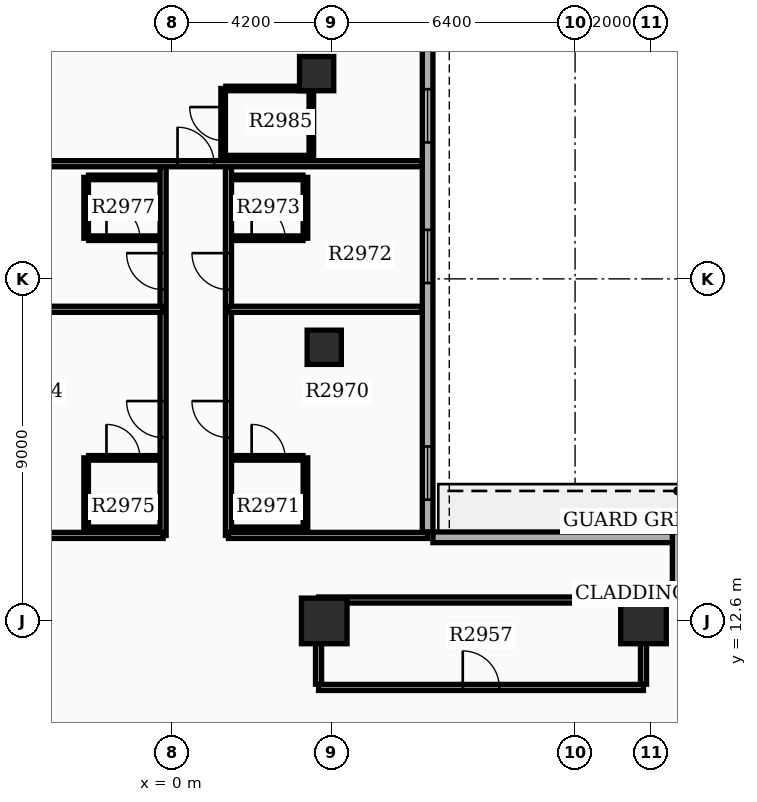
"""IFC4 building model, lengths in metres.
Left out: names, types, materials, properties, quantities, classifications, styles, units other than length and angle.
Written with IfcOpenShell. Run it as: python <this file> out.ifc"""

import sys

from ifc_helpers import new_model, si_unit, direction, frame, frame_2d, origin, origin_2d, place, context, subcontext, project, spatial, rectangle, extrude, element, fill, save


model = new_model("IFC4")
c1 = context("Model", 3, precision=1e-05, world=origin(), true_north=direction((0.0, 1.0)))
c2 = subcontext(c1, "Body", "Model", "MODEL_VIEW")
j1 = project(units=[si_unit("LENGTHUNIT", "METRE"), si_unit("PLANEANGLEUNIT", "RADIAN")], contexts=[c1])
p1 = place(None, origin())
s1 = spatial("IfcSite", under=j1, at=p1, CompositionType="ELEMENT")
p2 = place(p1, origin())
s2 = spatial("IfcBuilding", under=s1, at=p2, CompositionType="ELEMENT")
p3 = place(p2, frame((0.0, 0.0, 183.9)))
s3 = spatial("IfcBuildingStorey", under=s2, at=p3, CompositionType="ELEMENT", Elevation=183.9)
for number, where, z_axis, x_axis in (
    (1, (12.4, 12.6, 0.0), (0.0, 0.0, 1.0), (1.0, 0.0, 0.0)),
    (2, (4.0, 12.6, 0.0), (0.0, 0.0, 1.0), (1.0, 0.0, 0.0)),
):
    element("IfcColumn", number, at=place(p3, frame(where, z_axis=z_axis, x_axis=x_axis)), inside=s3, PredefinedType="COLUMN", context=c2, shape_type="SweptSolid", body=[
        extrude(rectangle(XDim=1.2, YDim=1.2, at=origin_2d()), origin(), (0.0, 0.0, 1.0), 3.9),
    ])
for number, where, z_axis, x_axis in (
    (3, (4.0, 19.8, 0.0), (0.0, 0.0, 1.0), (1.0, 0.0, 0.0)),
    (4, (3.8, 27.0, 0.0), (0.0, 0.0, 1.0), (1.0, 0.0, 0.0)),
):
    element("IfcColumn", number, at=place(p3, frame(where, z_axis=z_axis, x_axis=x_axis)), inside=s3, PredefinedType="COLUMN", context=c2, shape_type="SweptSolid", body=[
        extrude(rectangle(XDim=0.9, YDim=0.9, at=origin_2d()), origin(), (0.0, 0.0, 1.0), 3.9),
    ])
p4 = place(p3, frame((6.72, 14.94, 0.0), z_axis=(0.0, 0.0, 1.0), x_axis=(0.0, 1.0, 0.0)))
e5 = element("IfcWall", 5, at=p4, inside=s3, PredefinedType="STANDARD", context=c2, shape_type="SweptSolid", body=[
    extrude(rectangle(XDim=20.1, YDim=0.28, at=frame_2d((10.05, 0.0))), origin(), (0.0, 0.0, 1.0), 2.97),
])
p5 = place(p4, frame((0.85, 0.0, 0.8)))
e6 = element("IfcOpeningElement", 6, at=p5, cuts=e5, PredefinedType="OPENING", context=c2, shape_type="SweptSolid", body=[
    extrude(rectangle(XDim=1.4, YDim=1.6, at=frame_2d((0.7, 0.8))), frame((0.0, 0.15, 0.0), z_axis=(0.0, -1.0, 0.0), x_axis=(1.0, 0.0, 0.0)), (0.0, 0.0, 1.0), 0.3),
])
p6 = place(p4, frame((6.55, 0.0, 0.8)))
e7 = element("IfcOpeningElement", 7, at=p6, cuts=e5, PredefinedType="OPENING", context=c2, shape_type="SweptSolid", body=[
    extrude(rectangle(XDim=1.4, YDim=1.6, at=frame_2d((0.7, 0.8))), frame((0.0, 0.15, 0.0), z_axis=(0.0, -1.0, 0.0), x_axis=(1.0, 0.0, 0.0)), (0.0, 0.0, 1.0), 0.3),
])
p7 = place(p4, frame((10.25, 0.0, 0.8)))
e8 = element("IfcOpeningElement", 8, at=p7, cuts=e5, PredefinedType="OPENING", context=c2, shape_type="SweptSolid", body=[
    extrude(rectangle(XDim=1.4, YDim=1.6, at=frame_2d((0.7, 0.8))), frame((0.0, 0.15, 0.0), z_axis=(0.0, -1.0, 0.0), x_axis=(1.0, 0.0, 0.0)), (0.0, 0.0, 1.0), 0.3),
])
p8 = place(p4, frame((13.45, 0.0, 0.8)))
e9 = element("IfcOpeningElement", 9, at=p8, cuts=e5, PredefinedType="OPENING", context=c2, shape_type="SweptSolid", body=[
    extrude(rectangle(XDim=1.4, YDim=1.6, at=frame_2d((0.7, 0.8))), frame((0.0, 0.15, 0.0), z_axis=(0.0, -1.0, 0.0), x_axis=(1.0, 0.0, 0.0)), (0.0, 0.0, 1.0), 0.3),
])
p9 = place(p3, frame((13.3, 13.44, 0.0), z_axis=(0.0, 0.0, 1.0), x_axis=(0.0, 1.0, 0.0)))
e10 = element("IfcWall", 10, at=p9, inside=s3, PredefinedType="STANDARD", context=c2, shape_type="SweptSolid", body=[
    extrude(rectangle(XDim=1.5, YDim=0.28, at=frame_2d((0.75, 0.0))), origin(), (0.0, 0.0, 1.0), 2.97),
])
p10 = place(p3, frame((13.16, 14.8, 0.0), z_axis=(0.0, 0.0, 1.0), x_axis=(-1.0, 0.0, 0.0)))
e11 = element("IfcWall", 11, at=p10, inside=s3, PredefinedType="STANDARD", context=c2, shape_type="SweptSolid", body=[
    extrude(rectangle(XDim=6.3, YDim=0.28, at=frame_2d((3.15, 0.0))), origin(), (0.0, 0.0, 1.0), 2.97),
])
p11 = place(p3, frame((3.85, 10.85, 0.0), z_axis=(0.0, 0.0, 1.0), x_axis=(1.0, 0.0, 0.0)))
e12 = element("IfcWall", 12, at=p11, inside=s3, PredefinedType="PARTITIONING", context=c2, shape_type="SweptSolid", body=[
    extrude(rectangle(XDim=8.55, YDim=0.16, at=frame_2d((4.275, 0.0))), origin(), (0.0, 0.0, 1.0), 2.96),
])
p12 = place(p11, frame((3.795, 0.0, 0.0)))
e13 = element("IfcOpeningElement", 13, at=p12, cuts=e12, PredefinedType="OPENING", context=c2, shape_type="SweptSolid", body=[
    extrude(rectangle(XDim=0.96, YDim=2.15, at=frame_2d((0.48, 1.075))), frame((0.0, 0.09, 0.0), z_axis=(0.0, -1.0, 0.0), x_axis=(1.0, 0.0, 0.0)), (0.0, 0.0, 1.0), 0.18),
])
p13 = place(p3, frame((3.85, 13.15, 0.0), z_axis=(0.0, 0.0, 1.0), x_axis=(1.0, 0.0, 0.0)))
e14 = element("IfcWall", 14, at=p13, inside=s3, PredefinedType="PARTITIONING", context=c2, shape_type="SweptSolid", body=[
    extrude(rectangle(XDim=8.55, YDim=0.16, at=frame_2d((4.275, 0.0))), origin(), (0.0, 0.0, 1.0), 2.96),
])
for number, where, z_axis, x_axis in (
    (15, (3.85, 10.935, 0.0), (0.0, 0.0, 1.0), (0.0, 1.0, 0.0)),
    (16, (12.4, 10.935, 0.0), (0.0, 0.0, 1.0), (0.0, 1.0, 0.0)),
):
    element("IfcWall", number, at=place(p3, frame(where, z_axis=z_axis, x_axis=x_axis)), inside=s3, PredefinedType="PARTITIONING", context=c2, shape_type="SweptSolid", body=[
        extrude(rectangle(XDim=2.13, YDim=0.16, at=frame_2d((1.065, 0.0))), origin(), (0.0, 0.0, 1.0), 2.96),
    ])
p14 = place(p3, frame((1.48, 14.85, 0.0), z_axis=(0.0, 0.0, 1.0), x_axis=(0.0, 1.0, 0.0)))
e17 = element("IfcWall", 17, at=p14, inside=s3, PredefinedType="PARTITIONING", context=c2, shape_type="SweptSolid", body=[
    extrude(rectangle(XDim=9.7, YDim=0.16, at=frame_2d((4.85, 0.0))), origin(), (0.0, 0.0, 1.0), 2.96),
])
p15 = place(p14, frame((2.575, 0.0, 0.0)))
e18 = element("IfcOpeningElement", 18, at=p15, cuts=e17, PredefinedType="OPENING", context=c2, shape_type="SweptSolid", body=[
    extrude(rectangle(XDim=0.96, YDim=2.15, at=frame_2d((0.48, 1.075))), frame((0.0, 0.09, 0.0), z_axis=(0.0, -1.0, 0.0), x_axis=(1.0, 0.0, 0.0)), (0.0, 0.0, 1.0), 0.18),
])
p16 = place(p14, frame((6.467, 0.0, 0.0)))
e19 = element("IfcOpeningElement", 19, at=p16, cuts=e17, PredefinedType="OPENING", context=c2, shape_type="SweptSolid", body=[
    extrude(rectangle(XDim=0.96, YDim=2.15, at=frame_2d((0.48, 1.075))), frame((0.0, 0.09, 0.0), z_axis=(0.0, -1.0, 0.0), x_axis=(1.0, 0.0, 0.0)), (0.0, 0.0, 1.0), 0.18),
])
p17 = place(p3, frame((1.48, 14.85, 0.0), z_axis=(0.0, 0.0, 1.0), x_axis=(1.0, 0.0, 0.0)))
e20 = element("IfcWall", 20, at=p17, inside=s3, PredefinedType="PARTITIONING", context=c2, shape_type="SweptSolid", body=[
    extrude(rectangle(XDim=5.24, YDim=0.16, at=frame_2d((2.62, 0.0))), origin(), (0.0, 0.0, 1.0), 2.96),
])
p18 = place(p3, frame((1.48, 20.8, 0.0), z_axis=(0.0, 0.0, 1.0), x_axis=(1.0, 0.0, 0.0)))
e21 = element("IfcWall", 21, at=p18, inside=s3, PredefinedType="PARTITIONING", context=c2, shape_type="SweptSolid", body=[
    extrude(rectangle(XDim=5.092, YDim=0.16, at=frame_2d((2.546, 0.0))), origin(), (0.0, 0.0, 1.0), 2.96),
])
p19 = place(p3, frame((1.62, 16.89, 0.0), z_axis=(0.0, 0.0, 1.0), x_axis=(1.0, 0.0, 0.0)))
e22 = element("IfcWall", 22, at=p19, inside=s3, PredefinedType="PARTITIONING", context=c2, shape_type="SweptSolid", body=[
    extrude(rectangle(XDim=1.82, YDim=0.12, at=frame_2d((0.91, 0.0))), origin(), (0.0, 0.0, 1.0), 2.96),
])
p20 = place(p19, frame((0.47, 0.0, 0.0)))
e23 = element("IfcOpeningElement", 23, at=p20, cuts=e22, PredefinedType="OPENING", context=c2, shape_type="SweptSolid", body=[
    extrude(rectangle(XDim=0.88, YDim=2.1, at=frame_2d((0.44, 1.05))), frame((0.0, 0.07, 0.0), z_axis=(0.0, -1.0, 0.0), x_axis=(1.0, 0.0, 0.0)), (0.0, 0.0, 1.0), 0.14),
])
p21 = place(p3, frame((1.62, 15.01, 0.0), z_axis=(0.0, 0.0, 1.0), x_axis=(1.0, 0.0, 0.0)))
e24 = element("IfcWall", 24, at=p21, inside=s3, PredefinedType="PARTITIONING", context=c2, shape_type="SweptSolid", body=[
    extrude(rectangle(XDim=1.82, YDim=0.12, at=frame_2d((0.91, 0.0))), origin(), (0.0, 0.0, 1.0), 2.96),
])
p22 = place(p3, frame((3.505, 15.01, 0.0), z_axis=(0.0, 0.0, 1.0), x_axis=(0.0, 1.0, 0.0)))
e25 = element("IfcWall", 25, at=p22, inside=s3, PredefinedType="PARTITIONING", context=c2, shape_type="SweptSolid", body=[
    extrude(rectangle(XDim=1.88, YDim=0.12, at=frame_2d((0.94, 0.0))), origin(), (0.0, 0.0, 1.0), 2.96),
])
p23 = place(p3, frame((1.62, 22.67, 0.0), z_axis=(0.0, 0.0, 1.0), x_axis=(1.0, 0.0, 0.0)))
e26 = element("IfcWall", 26, at=p23, inside=s3, PredefinedType="PARTITIONING", context=c2, shape_type="SweptSolid", body=[
    extrude(rectangle(XDim=1.82, YDim=0.12, at=frame_2d((0.91, 0.0))), origin(), (0.0, 0.0, 1.0), 2.96),
])
p24 = place(p23, frame((0.47, 0.0, 0.0)))
e27 = element("IfcOpeningElement", 27, at=p24, cuts=e26, PredefinedType="OPENING", context=c2, shape_type="SweptSolid", body=[
    extrude(rectangle(XDim=0.88, YDim=2.1, at=frame_2d((0.44, 1.05))), frame((0.0, 0.07, 0.0), z_axis=(0.0, -1.0, 0.0), x_axis=(1.0, 0.0, 0.0)), (0.0, 0.0, 1.0), 0.14),
])
p25 = place(p3, frame((1.62, 24.27, 0.0), z_axis=(0.0, 0.0, 1.0), x_axis=(1.0, 0.0, 0.0)))
e28 = element("IfcWall", 28, at=p25, inside=s3, PredefinedType="PARTITIONING", context=c2, shape_type="SweptSolid", body=[
    extrude(rectangle(XDim=1.82, YDim=0.12, at=frame_2d((0.91, 0.0))), origin(), (0.0, 0.0, 1.0), 2.96),
])
p26 = place(p3, frame((3.505, 22.67, 0.0), z_axis=(0.0, 0.0, 1.0), x_axis=(0.0, 1.0, 0.0)))
e29 = element("IfcWall", 29, at=p26, inside=s3, PredefinedType="PARTITIONING", context=c2, shape_type="SweptSolid", body=[
    extrude(rectangle(XDim=1.6, YDim=0.12, at=frame_2d((0.8, 0.0))), origin(), (0.0, 0.0, 1.0), 2.96),
])
p27 = place(p3, frame((-0.24, 14.85, 0.0), z_axis=(0.0, 0.0, 1.0), x_axis=(0.0, 1.0, 0.0)))
e30 = element("IfcWall", 30, at=p27, inside=s3, PredefinedType="PARTITIONING", context=c2, shape_type="SweptSolid", body=[
    extrude(rectangle(XDim=9.7, YDim=0.16, at=frame_2d((4.85, 0.0))), origin(), (0.0, 0.0, 1.0), 2.96),
])
p28 = place(p27, frame((2.575, 0.0, 0.0)))
e31 = element("IfcOpeningElement", 31, at=p28, cuts=e30, PredefinedType="OPENING", context=c2, shape_type="SweptSolid", body=[
    extrude(rectangle(XDim=0.96, YDim=2.15, at=frame_2d((0.48, 1.075))), frame((0.0, 0.09, 0.0), z_axis=(0.0, -1.0, 0.0), x_axis=(1.0, 0.0, 0.0)), (0.0, 0.0, 1.0), 0.18),
])
p29 = place(p27, frame((6.467, 0.0, 0.0)))
e32 = element("IfcOpeningElement", 32, at=p29, cuts=e30, PredefinedType="OPENING", context=c2, shape_type="SweptSolid", body=[
    extrude(rectangle(XDim=0.96, YDim=2.15, at=frame_2d((0.48, 1.075))), frame((0.0, 0.09, 0.0), z_axis=(0.0, -1.0, 0.0), x_axis=(1.0, 0.0, 0.0)), (0.0, 0.0, 1.0), 0.18),
])
p30 = place(p3, frame((-0.24, 14.85, 0.0), z_axis=(0.0, 0.0, 1.0), x_axis=(-1.0, 0.0, 0.0)))
e33 = element("IfcWall", 33, at=p30, inside=s3, PredefinedType="PARTITIONING", context=c2, shape_type="SweptSolid", body=[
    extrude(rectangle(XDim=6.48, YDim=0.16, at=frame_2d((3.24, 0.0))), origin(), (0.0, 0.0, 1.0), 2.96),
])
p31 = place(p3, frame((-0.24, 20.8, 0.0), z_axis=(0.0, 0.0, 1.0), x_axis=(-1.0, 0.0, 0.0)))
e34 = element("IfcWall", 34, at=p31, inside=s3, PredefinedType="PARTITIONING", context=c2, shape_type="SweptSolid", body=[
    extrude(rectangle(XDim=6.332, YDim=0.16, at=frame_2d((3.166, 0.0))), origin(), (0.0, 0.0, 1.0), 2.96),
])
p32 = place(p3, frame((-2.2, 16.89, 0.0), z_axis=(0.0, 0.0, 1.0), x_axis=(1.0, 0.0, 0.0)))
e35 = element("IfcWall", 35, at=p32, inside=s3, PredefinedType="PARTITIONING", context=c2, shape_type="SweptSolid", body=[
    extrude(rectangle(XDim=1.82, YDim=0.12, at=frame_2d((0.91, 0.0))), origin(), (0.0, 0.0, 1.0), 2.96),
])
p33 = place(p32, frame((0.47, 0.0, 0.0)))
e36 = element("IfcOpeningElement", 36, at=p33, cuts=e35, PredefinedType="OPENING", context=c2, shape_type="SweptSolid", body=[
    extrude(rectangle(XDim=0.88, YDim=2.1, at=frame_2d((0.44, 1.05))), frame((0.0, 0.07, 0.0), z_axis=(0.0, -1.0, 0.0), x_axis=(1.0, 0.0, 0.0)), (0.0, 0.0, 1.0), 0.14),
])
p34 = place(p3, frame((-2.2, 15.01, 0.0), z_axis=(0.0, 0.0, 1.0), x_axis=(1.0, 0.0, 0.0)))
e37 = element("IfcWall", 37, at=p34, inside=s3, PredefinedType="PARTITIONING", context=c2, shape_type="SweptSolid", body=[
    extrude(rectangle(XDim=1.82, YDim=0.12, at=frame_2d((0.91, 0.0))), origin(), (0.0, 0.0, 1.0), 2.96),
])
p35 = place(p3, frame((-2.265, 15.01, 0.0), z_axis=(0.0, 0.0, 1.0), x_axis=(0.0, 1.0, 0.0)))
e38 = element("IfcWall", 38, at=p35, inside=s3, PredefinedType="PARTITIONING", context=c2, shape_type="SweptSolid", body=[
    extrude(rectangle(XDim=1.88, YDim=0.12, at=frame_2d((0.94, 0.0))), origin(), (0.0, 0.0, 1.0), 2.96),
])
p36 = place(p3, frame((-2.2, 22.67, 0.0), z_axis=(0.0, 0.0, 1.0), x_axis=(1.0, 0.0, 0.0)))
e39 = element("IfcWall", 39, at=p36, inside=s3, PredefinedType="PARTITIONING", context=c2, shape_type="SweptSolid", body=[
    extrude(rectangle(XDim=1.82, YDim=0.12, at=frame_2d((0.91, 0.0))), origin(), (0.0, 0.0, 1.0), 2.96),
])
p37 = place(p36, frame((0.47, 0.0, 0.0)))
e40 = element("IfcOpeningElement", 40, at=p37, cuts=e39, PredefinedType="OPENING", context=c2, shape_type="SweptSolid", body=[
    extrude(rectangle(XDim=0.88, YDim=2.1, at=frame_2d((0.44, 1.05))), frame((0.0, 0.07, 0.0), z_axis=(0.0, -1.0, 0.0), x_axis=(1.0, 0.0, 0.0)), (0.0, 0.0, 1.0), 0.14),
])
p38 = place(p3, frame((-2.2, 24.27, 0.0), z_axis=(0.0, 0.0, 1.0), x_axis=(1.0, 0.0, 0.0)))
e41 = element("IfcWall", 41, at=p38, inside=s3, PredefinedType="PARTITIONING", context=c2, shape_type="SweptSolid", body=[
    extrude(rectangle(XDim=1.82, YDim=0.12, at=frame_2d((0.91, 0.0))), origin(), (0.0, 0.0, 1.0), 2.96),
])
p39 = place(p3, frame((-2.265, 22.67, 0.0), z_axis=(0.0, 0.0, 1.0), x_axis=(0.0, 1.0, 0.0)))
e42 = element("IfcWall", 42, at=p39, inside=s3, PredefinedType="PARTITIONING", context=c2, shape_type="SweptSolid", body=[
    extrude(rectangle(XDim=1.6, YDim=0.12, at=frame_2d((0.8, 0.0))), origin(), (0.0, 0.0, 1.0), 2.96),
])
p40 = place(p3, frame((-6.572, 24.63, 0.0), z_axis=(0.0, 0.0, 1.0), x_axis=(1.0, 0.0, 0.0)))
e43 = element("IfcWall", 43, at=p40, inside=s3, PredefinedType="PARTITIONING", context=c2, shape_type="SweptSolid", body=[
    extrude(rectangle(XDim=13.144, YDim=0.16, at=frame_2d((6.572, 0.0))), origin(), (0.0, 0.0, 1.0), 2.96),
])
p41 = place(p40, frame((6.712, 0.0, 0.0)))
e44 = element("IfcOpeningElement", 44, at=p41, cuts=e43, PredefinedType="OPENING", context=c2, shape_type="SweptSolid", body=[
    extrude(rectangle(XDim=0.96, YDim=2.15, at=frame_2d((0.48, 1.075))), frame((0.0, 0.09, 0.0), z_axis=(0.0, -1.0, 0.0), x_axis=(1.0, 0.0, 0.0)), (0.0, 0.0, 1.0), 0.18),
])
p42 = place(p3, frame((1.34, 24.79, 0.0), z_axis=(0.0, 0.0, 1.0), x_axis=(0.0, 1.0, 0.0)))
e45 = element("IfcWall", 45, at=p42, inside=s3, PredefinedType="PARTITIONING", context=c2, shape_type="SweptSolid", body=[
    extrude(rectangle(XDim=1.82, YDim=0.12, at=frame_2d((0.91, 0.0))), origin(), (0.0, 0.0, 1.0), 2.96),
])
p43 = place(p42, frame((0.45, 0.0, 0.0)))
e46 = element("IfcOpeningElement", 46, at=p43, cuts=e45, PredefinedType="OPENING", context=c2, shape_type="SweptSolid", body=[
    extrude(rectangle(XDim=0.88, YDim=2.1, at=frame_2d((0.44, 1.05))), frame((0.0, 0.07, 0.0), z_axis=(0.0, -1.0, 0.0), x_axis=(1.0, 0.0, 0.0)), (0.0, 0.0, 1.0), 0.14),
])
p44 = place(p3, frame((3.66, 24.79, 0.0), z_axis=(0.0, 0.0, 1.0), x_axis=(0.0, 1.0, 0.0)))
e47 = element("IfcWall", 47, at=p44, inside=s3, PredefinedType="PARTITIONING", context=c2, shape_type="SweptSolid", body=[
    extrude(rectangle(XDim=1.82, YDim=0.12, at=frame_2d((0.91, 0.0))), origin(), (0.0, 0.0, 1.0), 2.96),
])
for number, where, z_axis, x_axis in (
    (48, (1.41, 24.79, 0.0), (0.0, 0.0, 1.0), (1.0, 0.0, 0.0)),
    (49, (1.41, 26.61, 0.0), (0.0, 0.0, 1.0), (1.0, 0.0, 0.0)),
):
    element("IfcWall", number, at=place(p3, frame(where, z_axis=z_axis, x_axis=x_axis)), inside=s3, PredefinedType="PARTITIONING", context=c2, shape_type="SweptSolid", body=[
        extrude(rectangle(XDim=2.18, YDim=0.12, at=frame_2d((1.09, 0.0))), origin(), (0.0, 0.0, 1.0), 2.96),
    ])
p45 = place(p5, origin())
e50 = element("IfcWindow", 50, at=p45, inside=s3, PartitioningType="SINGLE_PANEL", PredefinedType="WINDOW", context=c2, shape_type="SweptSolid", body=[
    extrude(rectangle(XDim=1.4, YDim=1.6, at=frame_2d((0.7, 0.8))), frame((0.0, 0.03, 0.0), z_axis=(0.0, -1.0, 0.0), x_axis=(1.0, 0.0, 0.0)), (0.0, 0.0, 1.0), 0.06),
])
fill(e6, e50)
p46 = place(p6, origin())
e51 = element("IfcWindow", 51, at=p46, inside=s3, PartitioningType="SINGLE_PANEL", PredefinedType="WINDOW", context=c2, shape_type="SweptSolid", body=[
    extrude(rectangle(XDim=1.4, YDim=1.6, at=frame_2d((0.7, 0.8))), frame((0.0, 0.03, 0.0), z_axis=(0.0, -1.0, 0.0), x_axis=(1.0, 0.0, 0.0)), (0.0, 0.0, 1.0), 0.06),
])
fill(e7, e51)
p47 = place(p7, origin())
e52 = element("IfcWindow", 52, at=p47, inside=s3, PartitioningType="SINGLE_PANEL", PredefinedType="WINDOW", context=c2, shape_type="SweptSolid", body=[
    extrude(rectangle(XDim=1.4, YDim=1.6, at=frame_2d((0.7, 0.8))), frame((0.0, 0.03, 0.0), z_axis=(0.0, -1.0, 0.0), x_axis=(1.0, 0.0, 0.0)), (0.0, 0.0, 1.0), 0.06),
])
fill(e8, e52)
p48 = place(p12, origin())
e53 = element("IfcDoor", 53, at=p48, inside=s3, OperationType="SINGLE_SWING_LEFT", PredefinedType="DOOR", context=c2, shape_type="SweptSolid", body=[
    extrude(rectangle(XDim=0.96, YDim=2.15, at=frame_2d((0.48, 1.075))), frame((0.0, 0.025, 0.0), z_axis=(0.0, -1.0, 0.0), x_axis=(1.0, 0.0, 0.0)), (0.0, 0.0, 1.0), 0.05),
])
fill(e13, e53)
p49 = place(p15, origin())
e54 = element("IfcDoor", 54, at=p49, inside=s3, OperationType="SINGLE_SWING_RIGHT", PredefinedType="DOOR", context=c2, shape_type="SweptSolid", body=[
    extrude(rectangle(XDim=0.96, YDim=2.15, at=frame_2d((0.48, 1.075))), frame((0.0, 0.025, 0.0), z_axis=(0.0, -1.0, 0.0), x_axis=(1.0, 0.0, 0.0)), (0.0, 0.0, 1.0), 0.05),
])
fill(e18, e54)
p50 = place(p20, origin())
e55 = element("IfcDoor", 55, at=p50, inside=s3, OperationType="SINGLE_SWING_LEFT", PredefinedType="DOOR", context=c2, shape_type="SweptSolid", body=[
    extrude(rectangle(XDim=0.88, YDim=2.1, at=frame_2d((0.44, 1.05))), frame((0.0, 0.025, 0.0), z_axis=(0.0, -1.0, 0.0), x_axis=(1.0, 0.0, 0.0)), (0.0, 0.0, 1.0), 0.05),
])
fill(e23, e55)
p51 = place(p16, origin())
e56 = element("IfcDoor", 56, at=p51, inside=s3, OperationType="SINGLE_SWING_RIGHT", PredefinedType="DOOR", context=c2, shape_type="SweptSolid", body=[
    extrude(rectangle(XDim=0.96, YDim=2.15, at=frame_2d((0.48, 1.075))), frame((0.0, 0.025, 0.0), z_axis=(0.0, -1.0, 0.0), x_axis=(1.0, 0.0, 0.0)), (0.0, 0.0, 1.0), 0.05),
])
fill(e19, e56)
p52 = place(p24, origin())
e57 = element("IfcDoor", 57, at=p52, inside=s3, OperationType="SINGLE_SWING_LEFT", PredefinedType="DOOR", context=c2, shape_type="SweptSolid", body=[
    extrude(rectangle(XDim=0.88, YDim=2.1, at=frame_2d((0.44, 1.05))), frame((0.0, 0.025, 0.0), z_axis=(0.0, -1.0, 0.0), x_axis=(1.0, 0.0, 0.0)), (0.0, 0.0, 1.0), 0.05),
])
fill(e27, e57)
p53 = place(p28, origin())
e58 = element("IfcDoor", 58, at=p53, inside=s3, OperationType="SINGLE_SWING_RIGHT", PredefinedType="DOOR", context=c2, shape_type="SweptSolid", body=[
    extrude(rectangle(XDim=0.96, YDim=2.15, at=frame_2d((0.48, 1.075))), frame((0.0, 0.025, 0.0), z_axis=(0.0, -1.0, 0.0), x_axis=(1.0, 0.0, 0.0)), (0.0, 0.0, 1.0), 0.05),
])
fill(e31, e58)
p54 = place(p33, origin())
e59 = element("IfcDoor", 59, at=p54, inside=s3, OperationType="SINGLE_SWING_LEFT", PredefinedType="DOOR", context=c2, shape_type="SweptSolid", body=[
    extrude(rectangle(XDim=0.88, YDim=2.1, at=frame_2d((0.44, 1.05))), frame((0.0, 0.025, 0.0), z_axis=(0.0, -1.0, 0.0), x_axis=(1.0, 0.0, 0.0)), (0.0, 0.0, 1.0), 0.05),
])
fill(e36, e59)
p55 = place(p29, origin())
e60 = element("IfcDoor", 60, at=p55, inside=s3, OperationType="SINGLE_SWING_RIGHT", PredefinedType="DOOR", context=c2, shape_type="SweptSolid", body=[
    extrude(rectangle(XDim=0.96, YDim=2.15, at=frame_2d((0.48, 1.075))), frame((0.0, 0.025, 0.0), z_axis=(0.0, -1.0, 0.0), x_axis=(1.0, 0.0, 0.0)), (0.0, 0.0, 1.0), 0.05),
])
fill(e32, e60)
p56 = place(p37, origin())
e61 = element("IfcDoor", 61, at=p56, inside=s3, OperationType="SINGLE_SWING_LEFT", PredefinedType="DOOR", context=c2, shape_type="SweptSolid", body=[
    extrude(rectangle(XDim=0.88, YDim=2.1, at=frame_2d((0.44, 1.05))), frame((0.0, 0.025, 0.0), z_axis=(0.0, -1.0, 0.0), x_axis=(1.0, 0.0, 0.0)), (0.0, 0.0, 1.0), 0.05),
])
fill(e40, e61)
p57 = place(p41, origin())
e62 = element("IfcDoor", 62, at=p57, inside=s3, OperationType="SINGLE_SWING_LEFT", PredefinedType="DOOR", context=c2, shape_type="SweptSolid", body=[
    extrude(rectangle(XDim=0.96, YDim=2.15, at=frame_2d((0.48, 1.075))), frame((0.0, 0.025, 0.0), z_axis=(0.0, -1.0, 0.0), x_axis=(1.0, 0.0, 0.0)), (0.0, 0.0, 1.0), 0.05),
])
fill(e44, e62)
p58 = place(p43, origin())
e63 = element("IfcDoor", 63, at=p58, inside=s3, OperationType="SINGLE_SWING_RIGHT", PredefinedType="DOOR", context=c2, shape_type="SweptSolid", body=[
    extrude(rectangle(XDim=0.88, YDim=2.1, at=frame_2d((0.44, 1.05))), frame((0.0, 0.025, 0.0), z_axis=(0.0, -1.0, 0.0), x_axis=(1.0, 0.0, 0.0)), (0.0, 0.0, 1.0), 0.05),
])
fill(e46, e63)
save(model, sys.argv[1])
